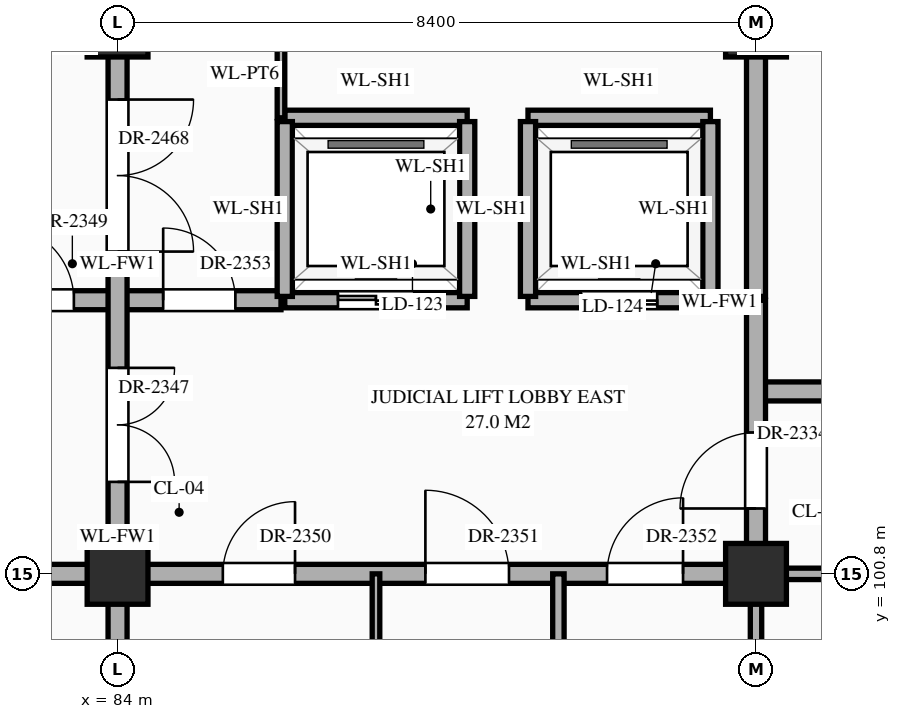
"""IFC4 building model, lengths in metres.
Left out: names, types, materials, properties, quantities, classifications, styles, units other than length and angle.
Written with IfcOpenShell. Run it as: python <this file> out.ifc"""

import sys

from ifc_helpers import new_model, si_unit, direction, frame, frame_2d, origin, origin_2d, place, context, subcontext, project, spatial, rectangle, extrude, element, fill, save


model = new_model("IFC4")
c1 = context("Model", 3, precision=1e-05, world=origin(), true_north=direction((0.0, 1.0)))
c2 = subcontext(c1, "Body", "Model", "MODEL_VIEW")
j1 = project(units=[si_unit("LENGTHUNIT", "METRE"), si_unit("PLANEANGLEUNIT", "RADIAN")], contexts=[c1])
p1 = place(None, origin())
s1 = spatial("IfcSite", under=j1, at=p1, CompositionType="ELEMENT")
p2 = place(p1, origin())
s2 = spatial("IfcBuilding", under=s1, at=p2, CompositionType="ELEMENT")
p3 = place(p2, frame((0.0, 0.0, 30.6)))
s3 = spatial("IfcBuildingStorey", under=s2, at=p3, CompositionType="ELEMENT", Elevation=30.6)
for number, where, z_axis, x_axis in (
    (1, (84.0, 100.8, 0.0), (0.0, 0.0, 1.0), (1.0, 0.0, 0.0)),
    (2, (84.0, 108.0, 0.0), (0.0, 0.0, 1.0), (1.0, 0.0, 0.0)),
    (3, (92.4, 100.8, 0.0), (0.0, 0.0, 1.0), (1.0, 0.0, 0.0)),
    (4, (92.4, 108.0, 0.0), (0.0, 0.0, 1.0), (1.0, 0.0, 0.0)),
):
    element("IfcColumn", number, at=place(p3, frame(where, z_axis=z_axis, x_axis=x_axis)), inside=s3, PredefinedType="COLUMN", context=c2, shape_type="SweptSolid", body=[
        extrude(rectangle(XDim=0.8, YDim=0.8, at=origin_2d()), origin(), (0.0, 0.0, 1.0), 4.5),
    ])
p4 = place(p3, frame((75.6, 100.8, 0.0), z_axis=(0.0, 0.0, 1.0), x_axis=(1.0, 0.0, 0.0)))
e5 = element("IfcWall", 5, at=p4, inside=s3, PredefinedType="STANDARD", context=c2, shape_type="SweptSolid", body=[
    extrude(rectangle(XDim=16.8, YDim=0.25, at=frame_2d((8.4, 0.0))), origin(), (0.0, 0.0, 1.0), 3.39),
])
p5 = place(p4, frame((3.65, 0.0, 0.0)))
e6 = element("IfcOpeningElement", 6, at=p5, cuts=e5, PredefinedType="OPENING", context=c2, shape_type="SweptSolid", body=[
    extrude(rectangle(XDim=1.1, YDim=2.2, at=frame_2d((0.55, 1.1))), frame((0.0, 0.137, 0.0), z_axis=(0.0, -1.0, 0.0), x_axis=(1.0, 0.0, 0.0)), (0.0, 0.0, 1.0), 0.274),
])
p6 = place(p4, frame((9.785, 0.0, 0.0)))
e7 = element("IfcOpeningElement", 7, at=p6, cuts=e5, PredefinedType="OPENING", context=c2, shape_type="SweptSolid", body=[
    extrude(rectangle(XDim=0.95, YDim=2.15, at=frame_2d((0.475, 1.075))), frame((0.0, 0.137, 0.0), z_axis=(0.0, -1.0, 0.0), x_axis=(1.0, 0.0, 0.0)), (0.0, 0.0, 1.0), 0.274),
])
p7 = place(p4, frame((12.45, 0.0, 0.0)))
e8 = element("IfcOpeningElement", 8, at=p7, cuts=e5, PredefinedType="OPENING", context=c2, shape_type="SweptSolid", body=[
    extrude(rectangle(XDim=1.1, YDim=2.2, at=frame_2d((0.55, 1.1))), frame((0.0, 0.137, 0.0), z_axis=(0.0, -1.0, 0.0), x_axis=(1.0, 0.0, 0.0)), (0.0, 0.0, 1.0), 0.274),
])
p8 = place(p4, frame((14.84, 0.0, 0.0)))
e9 = element("IfcOpeningElement", 9, at=p8, cuts=e5, PredefinedType="OPENING", context=c2, shape_type="SweptSolid", body=[
    extrude(rectangle(XDim=1.0, YDim=2.2, at=frame_2d((0.5, 1.1))), frame((0.0, 0.137, 0.0), z_axis=(0.0, -1.0, 0.0), x_axis=(1.0, 0.0, 0.0)), (0.0, 0.0, 1.0), 0.274),
])
p9 = place(p3, frame((92.4, 100.8, 0.0), z_axis=(0.0, 0.0, 1.0), x_axis=(1.0, 0.0, 0.0)))
e10 = element("IfcWall", 10, at=p9, inside=s3, PredefinedType="STANDARD", context=c2, shape_type="SweptSolid", body=[
    extrude(rectangle(XDim=4.2, YDim=0.15, at=frame_2d((2.1, 0.0))), origin(), (0.0, 0.0, 1.0), 3.39),
])
p10 = place(p9, frame((1.77, 0.0, 0.0)))
e11 = element("IfcOpeningElement", 11, at=p10, cuts=e10, PredefinedType="OPENING", context=c2, shape_type="SweptSolid", body=[
    extrude(rectangle(XDim=0.98, YDim=2.35, at=frame_2d((0.49, 1.175))), frame((0.0, 0.087, 0.0), z_axis=(0.0, -1.0, 0.0), x_axis=(1.0, 0.0, 0.0)), (0.0, 0.0, 1.0), 0.174),
])
p11 = place(p3, frame((92.4, 103.2, 0.0), z_axis=(0.0, 0.0, 1.0), x_axis=(1.0, 0.0, 0.0)))
e12 = element("IfcWall", 12, at=p11, inside=s3, PredefinedType="STANDARD", context=c2, shape_type="SweptSolid", body=[
    extrude(rectangle(XDim=4.2, YDim=0.25, at=frame_2d((2.1, 0.0))), origin(), (0.0, 0.0, 1.0), 4.24),
])
p12 = place(p11, frame((1.625, 0.0, 0.0)))
e13 = element("IfcOpeningElement", 13, at=p12, cuts=e12, PredefinedType="OPENING", context=c2, shape_type="SweptSolid", body=[
    extrude(rectangle(XDim=0.95, YDim=2.15, at=frame_2d((0.475, 1.075))), frame((0.0, 0.137, 0.0), z_axis=(0.0, -1.0, 0.0), x_axis=(1.0, 0.0, 0.0)), (0.0, 0.0, 1.0), 0.274),
])
p13 = place(p3, frame((81.85, 104.4, 0.0), z_axis=(0.0, 0.0, 1.0), x_axis=(1.0, 0.0, 0.0)))
e14 = element("IfcWall", 14, at=p13, inside=s3, PredefinedType="STANDARD", context=c2, shape_type="SweptSolid", body=[
    extrude(rectangle(XDim=4.3, YDim=0.25, at=frame_2d((2.15, 0.0))), origin(), (0.0, 0.0, 1.0), 4.24),
])
p14 = place(p13, frame((0.575, 0.0, 0.0)))
e15 = element("IfcOpeningElement", 15, at=p14, cuts=e14, PredefinedType="OPENING", context=c2, shape_type="SweptSolid", body=[
    extrude(rectangle(XDim=1.0, YDim=2.2, at=frame_2d((0.5, 1.1))), frame((0.0, 0.137, 0.0), z_axis=(0.0, -1.0, 0.0), x_axis=(1.0, 0.0, 0.0)), (0.0, 0.0, 1.0), 0.274),
])
p15 = place(p13, frame((2.75, 0.0, 0.0)))
e16 = element("IfcOpeningElement", 16, at=p15, cuts=e14, PredefinedType="OPENING", context=c2, shape_type="SweptSolid", body=[
    extrude(rectangle(XDim=0.95, YDim=2.15, at=frame_2d((0.475, 1.075))), frame((0.0, 0.137, 0.0), z_axis=(0.0, -1.0, 0.0), x_axis=(1.0, 0.0, 0.0)), (0.0, 0.0, 1.0), 0.274),
])
p16 = place(p3, frame((86.2, 104.4, 0.0), z_axis=(0.0, 0.0, 1.0), x_axis=(1.0, 0.0, 0.0)))
e17 = element("IfcWall", 17, at=p16, inside=s3, PredefinedType="STANDARD", context=c2, shape_type="SweptSolid", body=[
    extrude(rectangle(XDim=2.4, YDim=0.2, at=frame_2d((1.2, 0.0))), origin(), (0.0, 0.0, 1.0), 4.24),
])
p17 = place(p16, frame((0.7, 0.0, 0.0)))
e18 = element("IfcOpeningElement", 18, at=p17, cuts=e17, PredefinedType="OPENING", context=c2, shape_type="SweptSolid", body=[
    extrude(rectangle(XDim=1.0, YDim=2.15, at=frame_2d((0.5, 1.075))), frame((0.0, 0.112, 0.0), z_axis=(0.0, -1.0, 0.0), x_axis=(1.0, 0.0, 0.0)), (0.0, 0.0, 1.0), 0.224),
])
p18 = place(p3, frame((89.4, 104.4, 0.0), z_axis=(0.0, 0.0, 1.0), x_axis=(1.0, 0.0, 0.0)))
e19 = element("IfcWall", 19, at=p18, inside=s3, PredefinedType="STANDARD", context=c2, shape_type="SweptSolid", body=[
    extrude(rectangle(XDim=2.4, YDim=0.2, at=frame_2d((1.2, 0.0))), origin(), (0.0, 0.0, 1.0), 4.24),
])
p19 = place(p18, frame((0.7, 0.0, 0.0)))
e20 = element("IfcOpeningElement", 20, at=p19, cuts=e19, PredefinedType="OPENING", context=c2, shape_type="SweptSolid", body=[
    extrude(rectangle(XDim=1.0, YDim=2.15, at=frame_2d((0.5, 1.075))), frame((0.0, 0.112, 0.0), z_axis=(0.0, -1.0, 0.0), x_axis=(1.0, 0.0, 0.0)), (0.0, 0.0, 1.0), 0.224),
])
for number, where, z_axis, x_axis in (
    (21, (86.2, 106.8, 0.0), (0.0, 0.0, 1.0), (1.0, 0.0, 0.0)),
    (22, (89.4, 106.8, 0.0), (0.0, 0.0, 1.0), (1.0, 0.0, 0.0)),
):
    element("IfcWall", number, at=place(p3, frame(where, z_axis=z_axis, x_axis=x_axis)), inside=s3, PredefinedType="STANDARD", context=c2, shape_type="SweptSolid", body=[
        extrude(rectangle(XDim=2.4, YDim=0.2, at=frame_2d((1.2, 0.0))), origin(), (0.0, 0.0, 1.0), 4.24),
    ])
p20 = place(p3, frame((84.0, 79.24, 0.0), z_axis=(0.0, 0.0, 1.0), x_axis=(0.0, 1.0, 0.0)))
e23 = element("IfcWall", 23, at=p20, inside=s3, PredefinedType="STANDARD", context=c2, shape_type="SweptSolid", body=[
    extrude(rectangle(XDim=35.92, YDim=0.25, at=frame_2d((17.96, 0.0))), origin(), (0.0, 0.0, 1.0), 3.49),
])
p21 = place(p20, frame((22.77, 0.0, 0.0)))
e24 = element("IfcOpeningElement", 24, at=p21, cuts=e23, PredefinedType="OPENING", context=c2, shape_type="SweptSolid", body=[
    extrude(rectangle(XDim=1.5, YDim=2.25, at=frame_2d((0.75, 1.125))), frame((0.0, 0.137, 0.0), z_axis=(0.0, -1.0, 0.0), x_axis=(1.0, 0.0, 0.0)), (0.0, 0.0, 1.0), 0.274),
])
p22 = place(p20, frame((12.525, 0.0, 0.0)))
e25 = element("IfcOpeningElement", 25, at=p22, cuts=e23, PredefinedType="OPENING", context=c2, shape_type="SweptSolid", body=[
    extrude(rectangle(XDim=0.95, YDim=2.15, at=frame_2d((0.475, 1.075))), frame((0.0, 0.137, 0.0), z_axis=(0.0, -1.0, 0.0), x_axis=(1.0, 0.0, 0.0)), (0.0, 0.0, 1.0), 0.274),
])
p23 = place(p20, frame((15.22, 0.0, 0.0)))
e26 = element("IfcOpeningElement", 26, at=p23, cuts=e23, PredefinedType="OPENING", context=c2, shape_type="SweptSolid", body=[
    extrude(rectangle(XDim=1.0, YDim=2.2, at=frame_2d((0.5, 1.1))), frame((0.0, 0.137, 0.0), z_axis=(0.0, -1.0, 0.0), x_axis=(1.0, 0.0, 0.0)), (0.0, 0.0, 1.0), 0.274),
])
p24 = place(p20, frame((25.8, 0.0, 0.0)))
e27 = element("IfcOpeningElement", 27, at=p24, cuts=e23, PredefinedType="OPENING", context=c2, shape_type="SweptSolid", body=[
    extrude(rectangle(XDim=2.0, YDim=2.4, at=frame_2d((1.0, 1.2))), frame((0.0, 0.137, 0.0), z_axis=(0.0, -1.0, 0.0), x_axis=(1.0, 0.0, 0.0)), (0.0, 0.0, 1.0), 0.274),
])
p25 = place(p20, frame((29.57, 0.0, 0.0)))
e28 = element("IfcOpeningElement", 28, at=p25, cuts=e23, PredefinedType="OPENING", context=c2, shape_type="SweptSolid", body=[
    extrude(rectangle(XDim=1.1, YDim=2.2, at=frame_2d((0.55, 1.1))), frame((0.0, 0.137, 0.0), z_axis=(0.0, -1.0, 0.0), x_axis=(1.0, 0.0, 0.0)), (0.0, 0.0, 1.0), 0.274),
])
p26 = place(p20, frame((5.25, 0.0, 0.0)))
e29 = element("IfcOpeningElement", 29, at=p26, cuts=e23, PredefinedType="OPENING", context=c2, shape_type="SweptSolid", body=[
    extrude(rectangle(XDim=1.1, YDim=2.2, at=frame_2d((0.55, 1.1))), frame((0.0, 0.137, 0.0), z_axis=(0.0, -1.0, 0.0), x_axis=(1.0, 0.0, 0.0)), (0.0, 0.0, 1.0), 0.274),
])
p27 = place(p3, frame((86.15, 106.8, 0.0), z_axis=(0.0, 0.0, 1.0), x_axis=(0.0, 1.0, 0.0)))
e30 = element("IfcWall", 30, at=p27, inside=s3, PredefinedType="STANDARD", context=c2, shape_type="SweptSolid", body=[
    extrude(rectangle(XDim=1.15, YDim=0.1, at=frame_2d((0.575, 0.0))), origin(), (0.0, 0.0, 1.0), 4.24),
])
p28 = place(p3, frame((86.2, 104.45, 0.0), z_axis=(0.0, 0.0, 1.0), x_axis=(0.0, 1.0, 0.0)))
e31 = element("IfcWall", 31, at=p28, inside=s3, PredefinedType="STANDARD", context=c2, shape_type="SweptSolid", body=[
    extrude(rectangle(XDim=2.3, YDim=0.2, at=frame_2d((1.15, 0.0))), origin(), (0.0, 0.0, 1.0), 4.24),
])
p29 = place(p3, frame((87.4, 96.0, 0.0), z_axis=(0.0, 0.0, 1.0), x_axis=(0.0, 1.0, 0.0)))
e32 = element("IfcWall", 32, at=p29, inside=s3, PredefinedType="STANDARD", context=c2, shape_type="SweptSolid", body=[
    extrude(rectangle(XDim=4.8, YDim=0.1, at=frame_2d((2.4, 0.0))), origin(), (0.0, 0.0, 1.0), 4.24),
])
p30 = place(p29, frame((1.76, 0.0, 0.0)))
e33 = element("IfcOpeningElement", 33, at=p30, cuts=e32, PredefinedType="OPENING", context=c2, shape_type="SweptSolid", body=[
    extrude(rectangle(XDim=1.28, YDim=2.35, at=frame_2d((0.64, 1.175))), frame((0.0, 0.062, 0.0), z_axis=(0.0, -1.0, 0.0), x_axis=(1.0, 0.0, 0.0)), (0.0, 0.0, 1.0), 0.124),
])
for number, where, z_axis, x_axis in (
    (34, (88.6, 104.45, 0.0), (0.0, 0.0, 1.0), (0.0, 1.0, 0.0)),
    (35, (89.4, 104.45, 0.0), (0.0, 0.0, 1.0), (0.0, 1.0, 0.0)),
):
    element("IfcWall", number, at=place(p3, frame(where, z_axis=z_axis, x_axis=x_axis)), inside=s3, PredefinedType="STANDARD", context=c2, shape_type="SweptSolid", body=[
        extrude(rectangle(XDim=2.3, YDim=0.2, at=frame_2d((1.15, 0.0))), origin(), (0.0, 0.0, 1.0), 4.24),
    ])
p31 = place(p3, frame((89.8, 96.0, 0.0), z_axis=(0.0, 0.0, 1.0), x_axis=(0.0, 1.0, 0.0)))
e36 = element("IfcWall", 36, at=p31, inside=s3, PredefinedType="STANDARD", context=c2, shape_type="SweptSolid", body=[
    extrude(rectangle(XDim=4.8, YDim=0.15, at=frame_2d((2.4, 0.0))), origin(), (0.0, 0.0, 1.0), 4.24),
])
p32 = place(p31, frame((1.93, 0.0, 0.0)))
e37 = element("IfcOpeningElement", 37, at=p32, cuts=e36, PredefinedType="OPENING", context=c2, shape_type="SweptSolid", body=[
    extrude(rectangle(XDim=0.94, YDim=2.3, at=frame_2d((0.47, 1.15))), frame((0.0, 0.087, 0.0), z_axis=(0.0, -1.0, 0.0), x_axis=(1.0, 0.0, 0.0)), (0.0, 0.0, 1.0), 0.174),
])
p33 = place(p3, frame((91.8, 104.45, 0.0), z_axis=(0.0, 0.0, 1.0), x_axis=(0.0, 1.0, 0.0)))
e38 = element("IfcWall", 38, at=p33, inside=s3, PredefinedType="STANDARD", context=c2, shape_type="SweptSolid", body=[
    extrude(rectangle(XDim=2.3, YDim=0.2, at=frame_2d((1.15, 0.0))), origin(), (0.0, 0.0, 1.0), 4.24),
])
p34 = place(p3, frame((92.4, 96.0, 0.0), z_axis=(0.0, 0.0, 1.0), x_axis=(0.0, 1.0, 0.0)))
e39 = element("IfcWall", 39, at=p34, inside=s3, PredefinedType="STANDARD", context=c2, shape_type="SweptSolid", body=[
    extrude(rectangle(XDim=4.8, YDim=0.15, at=frame_2d((2.4, 0.0))), origin(), (0.0, 0.0, 1.0), 3.49),
])
p35 = place(p3, frame((92.4, 100.8, 0.0), z_axis=(0.0, 0.0, 1.0), x_axis=(0.0, 1.0, 0.0)))
e40 = element("IfcWall", 40, at=p35, inside=s3, PredefinedType="STANDARD", context=c2, shape_type="SweptSolid", body=[
    extrude(rectangle(XDim=3.6, YDim=0.25, at=frame_2d((1.8, 0.0))), origin(), (0.0, 0.0, 1.0), 3.49),
])
p36 = place(p35, frame((0.86, 0.0, 0.0)))
e41 = element("IfcOpeningElement", 41, at=p36, cuts=e40, PredefinedType="OPENING", context=c2, shape_type="SweptSolid", body=[
    extrude(rectangle(XDim=1.0, YDim=2.2, at=frame_2d((0.5, 1.1))), frame((0.0, 0.137, 0.0), z_axis=(0.0, -1.0, 0.0), x_axis=(1.0, 0.0, 0.0)), (0.0, 0.0, 1.0), 0.274),
])
p37 = place(p3, frame((92.4, 104.45, 0.0), z_axis=(0.0, 0.0, 1.0), x_axis=(0.0, 1.0, 0.0)))
e42 = element("IfcWall", 42, at=p37, inside=s3, PredefinedType="STANDARD", context=c2, shape_type="SweptSolid", body=[
    extrude(rectangle(XDim=3.5, YDim=0.25, at=frame_2d((1.75, 0.0))), origin(), (0.0, 0.0, 1.0), 3.49),
])
p38 = place(p17, origin())
e43 = element("IfcDoor", 43, at=p38, inside=s3, OperationType="DOUBLE_DOOR_SLIDING", PredefinedType="DOOR", context=c2, shape_type="SweptSolid", body=[
    extrude(rectangle(XDim=1.0, YDim=2.15, at=frame_2d((0.5, 1.075))), frame((0.0, 0.025, 0.0), z_axis=(0.0, -1.0, 0.0), x_axis=(1.0, 0.0, 0.0)), (0.0, 0.0, 1.0), 0.05),
])
fill(e18, e43)
p39 = place(p19, origin())
e44 = element("IfcDoor", 44, at=p39, inside=s3, OperationType="DOUBLE_DOOR_SLIDING", PredefinedType="DOOR", context=c2, shape_type="SweptSolid", body=[
    extrude(rectangle(XDim=1.0, YDim=2.15, at=frame_2d((0.5, 1.075))), frame((0.0, 0.025, 0.0), z_axis=(0.0, -1.0, 0.0), x_axis=(1.0, 0.0, 0.0)), (0.0, 0.0, 1.0), 0.05),
])
fill(e20, e44)
p40 = place(p36, origin())
e45 = element("IfcDoor", 45, at=p40, inside=s3, OperationType="SINGLE_SWING_LEFT", PredefinedType="DOOR", context=c2, shape_type="SweptSolid", body=[
    extrude(rectangle(XDim=1.0, YDim=2.2, at=frame_2d((0.5, 1.1))), frame((0.0, 0.025, 0.0), z_axis=(0.0, -1.0, 0.0), x_axis=(1.0, 0.0, 0.0)), (0.0, 0.0, 1.0), 0.05),
])
fill(e41, e45)
p41 = place(p21, frame((1.5, 0.0, 0.0), z_axis=(0.0, 0.0, 1.0), x_axis=(-1.0, 0.0, 0.0)))
e46 = element("IfcDoor", 46, at=p41, inside=s3, OperationType="DOUBLE_DOOR_SINGLE_SWING", PredefinedType="DOOR", context=c2, shape_type="SweptSolid", body=[
    extrude(rectangle(XDim=1.5, YDim=2.25, at=frame_2d((0.75, 1.125))), frame((0.0, 0.025, 0.0), z_axis=(0.0, -1.0, 0.0), x_axis=(1.0, 0.0, 0.0)), (0.0, 0.0, 1.0), 0.05),
])
fill(e24, e46)
p42 = place(p14, origin())
e47 = element("IfcDoor", 47, at=p42, inside=s3, OperationType="SINGLE_SWING_LEFT", PredefinedType="DOOR", context=c2, shape_type="SweptSolid", body=[
    extrude(rectangle(XDim=1.0, YDim=2.2, at=frame_2d((0.5, 1.1))), frame((0.0, 0.025, 0.0), z_axis=(0.0, -1.0, 0.0), x_axis=(1.0, 0.0, 0.0)), (0.0, 0.0, 1.0), 0.05),
])
fill(e15, e47)
p43 = place(p6, origin())
e48 = element("IfcDoor", 48, at=p43, inside=s3, OperationType="SINGLE_SWING_RIGHT", PredefinedType="DOOR", context=c2, shape_type="SweptSolid", body=[
    extrude(rectangle(XDim=0.95, YDim=2.15, at=frame_2d((0.475, 1.075))), frame((0.0, 0.025, 0.0), z_axis=(0.0, -1.0, 0.0), x_axis=(1.0, 0.0, 0.0)), (0.0, 0.0, 1.0), 0.05),
])
fill(e7, e48)
p44 = place(p7, origin())
e49 = element("IfcDoor", 49, at=p44, inside=s3, OperationType="SINGLE_SWING_LEFT", PredefinedType="DOOR", context=c2, shape_type="SweptSolid", body=[
    extrude(rectangle(XDim=1.1, YDim=2.2, at=frame_2d((0.55, 1.1))), frame((0.0, 0.025, 0.0), z_axis=(0.0, -1.0, 0.0), x_axis=(1.0, 0.0, 0.0)), (0.0, 0.0, 1.0), 0.05),
])
fill(e8, e49)
p45 = place(p8, origin())
e50 = element("IfcDoor", 50, at=p45, inside=s3, OperationType="SINGLE_SWING_RIGHT", PredefinedType="DOOR", context=c2, shape_type="SweptSolid", body=[
    extrude(rectangle(XDim=1.0, YDim=2.2, at=frame_2d((0.5, 1.1))), frame((0.0, 0.025, 0.0), z_axis=(0.0, -1.0, 0.0), x_axis=(1.0, 0.0, 0.0)), (0.0, 0.0, 1.0), 0.05),
])
fill(e9, e50)
p46 = place(p15, origin())
e51 = element("IfcDoor", 51, at=p46, inside=s3, OperationType="SINGLE_SWING_LEFT", PredefinedType="DOOR", context=c2, shape_type="SweptSolid", body=[
    extrude(rectangle(XDim=0.95, YDim=2.15, at=frame_2d((0.475, 1.075))), frame((0.0, 0.025, 0.0), z_axis=(0.0, -1.0, 0.0), x_axis=(1.0, 0.0, 0.0)), (0.0, 0.0, 1.0), 0.05),
])
fill(e16, e51)
p47 = place(p24, frame((2.0, 0.0, 0.0), z_axis=(0.0, 0.0, 1.0), x_axis=(-1.0, 0.0, 0.0)))
e52 = element("IfcDoor", 52, at=p47, inside=s3, OperationType="DOUBLE_DOOR_SINGLE_SWING", PredefinedType="DOOR", context=c2, shape_type="SweptSolid", body=[
    extrude(rectangle(XDim=2.0, YDim=2.4, at=frame_2d((1.0, 1.2))), frame((0.0, 0.025, 0.0), z_axis=(0.0, -1.0, 0.0), x_axis=(1.0, 0.0, 0.0)), (0.0, 0.0, 1.0), 0.05),
])
fill(e27, e52)
save(model, sys.argv[1])
